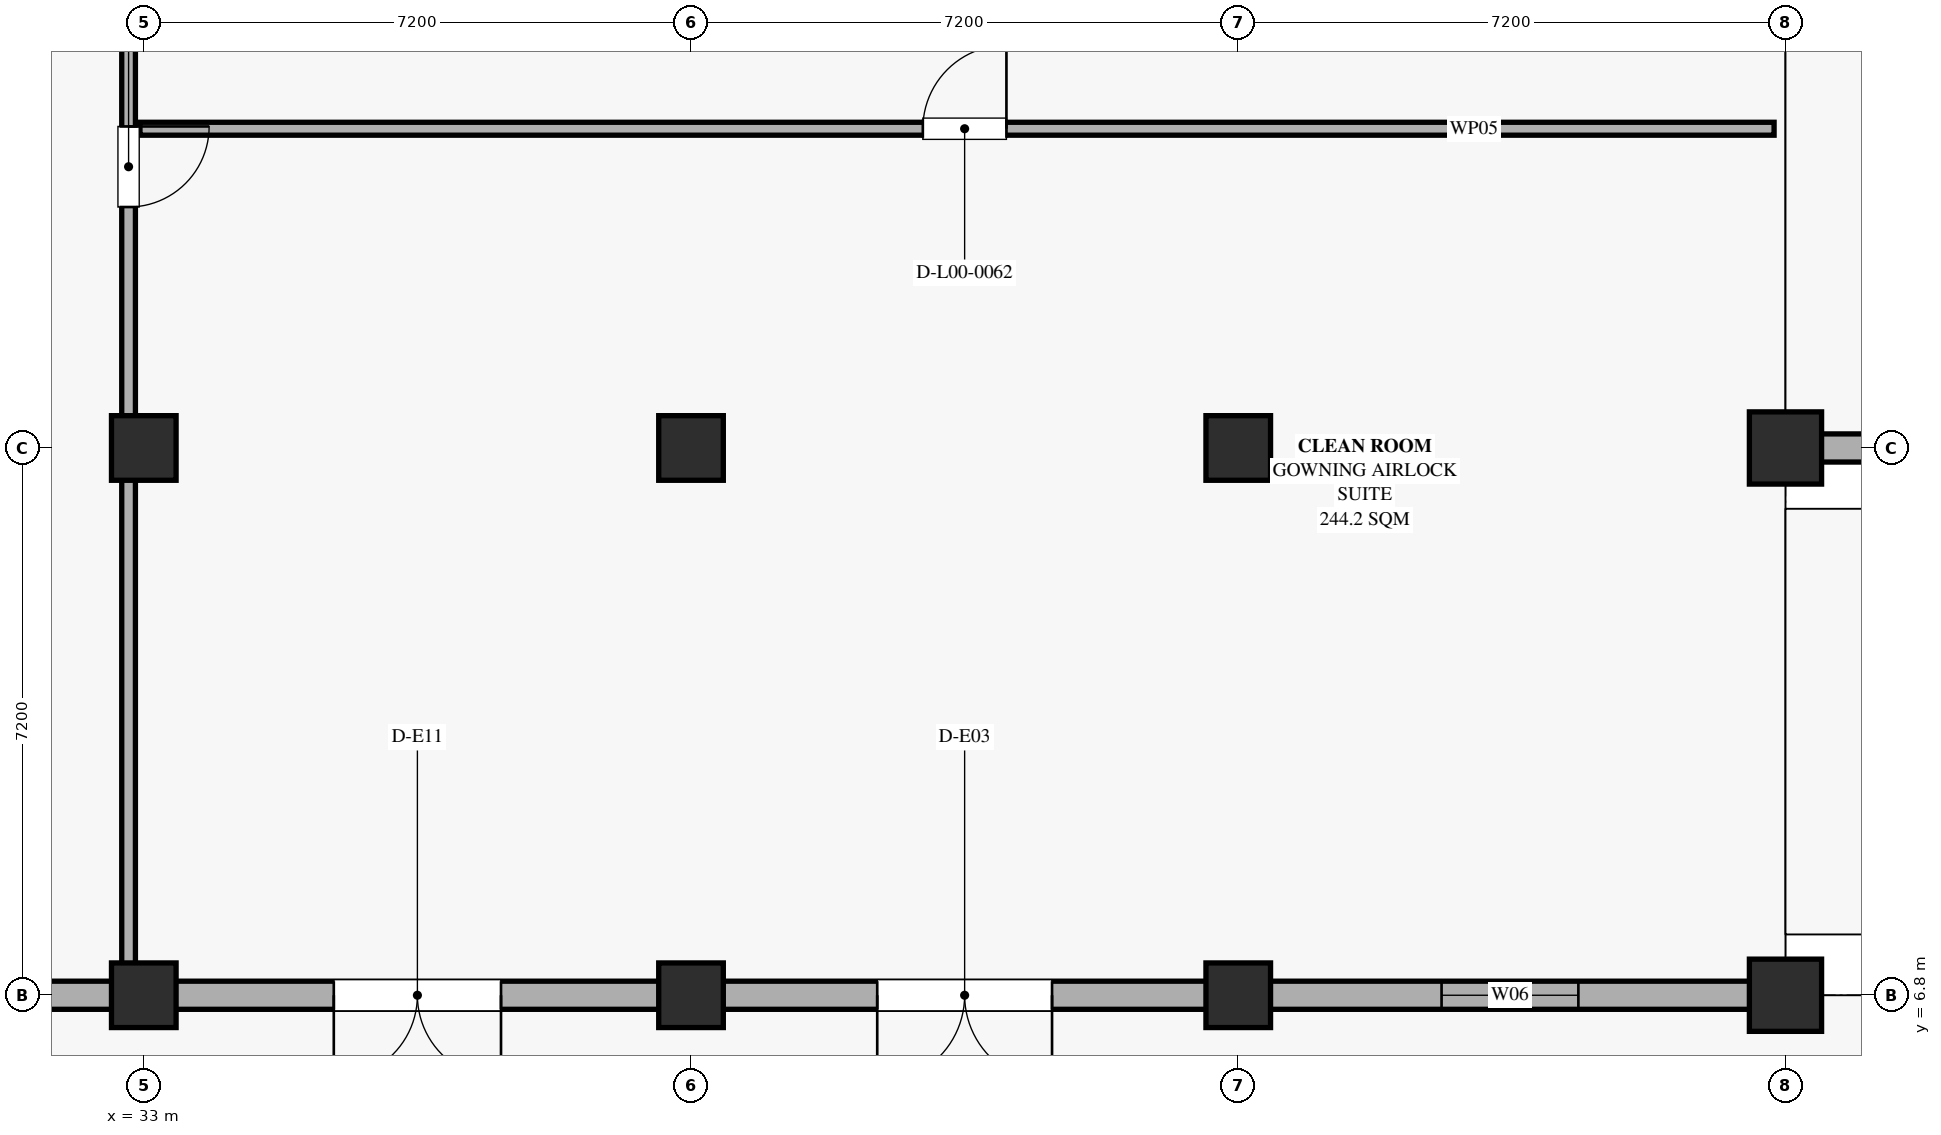
"""IFC4 building model, lengths in metres.
Left out: names, types, materials, properties, quantities, classifications, styles, units other than length and angle.
Written with IfcOpenShell. Run it as: python <this file> out.ifc"""

import sys

from ifc_helpers import new_model, si_unit, direction, frame, frame_2d, origin, origin_2d, place, context, subcontext, project, spatial, rectangle, extrude, element, fill, save


model = new_model("IFC4")
c1 = context("Model", 3, precision=1e-05, world=origin(), true_north=direction((0.0, 1.0)))
c2 = subcontext(c1, "Body", "Model", "MODEL_VIEW")
j1 = project(units=[si_unit("LENGTHUNIT", "METRE"), si_unit("PLANEANGLEUNIT", "RADIAN")], contexts=[c1])
p1 = place(None, origin())
s1 = spatial("IfcSite", under=j1, at=p1, CompositionType="ELEMENT")
p2 = place(p1, origin())
s2 = spatial("IfcBuilding", under=s1, at=p2, CompositionType="ELEMENT")
p3 = place(p2, origin())
s3 = spatial("IfcBuildingStorey", under=s2, at=p3, CompositionType="ELEMENT", Elevation=0.0)
for number, where, z_axis, x_axis in (
    (1, (33.0, 6.8, 0.0), (0.0, 0.0, 1.0), (1.0, 0.0, 0.0)),
    (2, (40.2, 6.8, 0.0), (0.0, 0.0, 1.0), (1.0, 0.0, 0.0)),
    (3, (47.4, 6.8, 0.0), (0.0, 0.0, 1.0), (1.0, 0.0, 0.0)),
):
    element("IfcColumn", number, at=place(p3, frame(where, z_axis=z_axis, x_axis=x_axis)), inside=s3, PredefinedType="COLUMN", context=c2, shape_type="SweptSolid", body=[
        extrude(rectangle(XDim=0.85, YDim=0.85, at=origin_2d()), origin(), (0.0, 0.0, 1.0), 5.4),
    ])
p4 = place(p3, frame((54.6, 6.8, 0.0), z_axis=(0.0, 0.0, 1.0), x_axis=(1.0, 0.0, 0.0)))
e4 = element("IfcColumn", 4, at=p4, inside=s3, PredefinedType="COLUMN", context=c2, shape_type="SweptSolid", body=[
    extrude(rectangle(XDim=0.95, YDim=0.95, at=origin_2d()), origin(), (0.0, 0.0, 1.0), 5.4),
])
for number, where, z_axis, x_axis in (
    (5, (33.0, 14.0, 0.0), (0.0, 0.0, 1.0), (1.0, 0.0, 0.0)),
    (6, (40.2, 14.0, 0.0), (0.0, 0.0, 1.0), (1.0, 0.0, 0.0)),
    (7, (47.4, 14.0, 0.0), (0.0, 0.0, 1.0), (1.0, 0.0, 0.0)),
):
    element("IfcColumn", number, at=place(p3, frame(where, z_axis=z_axis, x_axis=x_axis)), inside=s3, PredefinedType="COLUMN", context=c2, shape_type="SweptSolid", body=[
        extrude(rectangle(XDim=0.85, YDim=0.85, at=origin_2d()), origin(), (0.0, 0.0, 1.0), 5.4),
    ])
p5 = place(p3, frame((54.6, 14.0, 0.0), z_axis=(0.0, 0.0, 1.0), x_axis=(1.0, 0.0, 0.0)))
e8 = element("IfcColumn", 8, at=p5, inside=s3, PredefinedType="COLUMN", context=c2, shape_type="SweptSolid", body=[
    extrude(rectangle(XDim=0.95, YDim=0.95, at=origin_2d()), origin(), (0.0, 0.0, 1.0), 5.4),
])
p6 = place(p3, frame((54.14, 6.8, 0.0), z_axis=(0.0, 0.0, 1.0), x_axis=(-1.0, 0.0, 0.0)))
e9 = element("IfcWall", 9, at=p6, inside=s3, PredefinedType="SOLIDWALL", context=c2, shape_type="SweptSolid", body=[
    extrude(rectangle(XDim=6.33, YDim=0.37, at=frame_2d((3.165, 0.0))), origin(), (0.0, 0.0, 1.0), 3.9),
])
p7 = place(p6, frame((2.265, 0.0, 0.9)))
e10 = element("IfcOpeningElement", 10, at=p7, cuts=e9, PredefinedType="OPENING", context=c2, shape_type="SweptSolid", body=[
    extrude(rectangle(XDim=1.8, YDim=2.1, at=frame_2d((0.9, 1.05))), frame((0.0, 0.195, 0.0), z_axis=(0.0, -1.0, 0.0), x_axis=(1.0, 0.0, 0.0)), (0.0, 0.0, 1.0), 0.39),
])
p8 = place(p3, frame((46.99, 6.8, 0.0), z_axis=(0.0, 0.0, 1.0), x_axis=(-1.0, 0.0, 0.0)))
e11 = element("IfcWall", 11, at=p8, inside=s3, PredefinedType="SOLIDWALL", context=c2, shape_type="SweptSolid", body=[
    extrude(rectangle(XDim=6.38, YDim=0.37, at=frame_2d((3.19, 0.0))), origin(), (0.0, 0.0, 1.0), 3.9),
])
p9 = place(p8, frame((2.04, 0.0, 0.0)))
e12 = element("IfcOpeningElement", 12, at=p9, cuts=e11, PredefinedType="OPENING", context=c2, shape_type="SweptSolid", body=[
    extrude(rectangle(XDim=2.3, YDim=2.4, at=frame_2d((1.15, 1.2))), frame((0.0, 0.195, 0.0), z_axis=(0.0, -1.0, 0.0), x_axis=(1.0, 0.0, 0.0)), (0.0, 0.0, 1.0), 0.39),
])
p10 = place(p3, frame((39.79, 6.8, 0.0), z_axis=(0.0, 0.0, 1.0), x_axis=(-1.0, 0.0, 0.0)))
e13 = element("IfcWall", 13, at=p10, inside=s3, PredefinedType="SOLIDWALL", context=c2, shape_type="SweptSolid", body=[
    extrude(rectangle(XDim=6.38, YDim=0.37, at=frame_2d((3.19, 0.0))), origin(), (0.0, 0.0, 1.0), 3.9),
])
p11 = place(p10, frame((2.09, 0.0, 0.0)))
e14 = element("IfcOpeningElement", 14, at=p11, cuts=e13, PredefinedType="OPENING", context=c2, shape_type="SweptSolid", body=[
    extrude(rectangle(XDim=2.2, YDim=2.4, at=frame_2d((1.1, 1.2))), frame((0.0, 0.195, 0.0), z_axis=(0.0, -1.0, 0.0), x_axis=(1.0, 0.0, 0.0)), (0.0, 0.0, 1.0), 0.39),
])
p12 = place(p3, frame((32.59, 6.8, 0.0), z_axis=(0.0, 0.0, 1.0), x_axis=(-1.0, 0.0, 0.0)))
e15 = element("IfcWall", 15, at=p12, inside=s3, PredefinedType="SOLIDWALL", context=c2, shape_type="SweptSolid", body=[
    extrude(rectangle(XDim=6.38, YDim=0.37, at=frame_2d((3.19, 0.0))), origin(), (0.0, 0.0, 1.0), 3.9),
])
p13 = place(p12, frame((2.44, 0.0, 0.9)))
e16 = element("IfcOpeningElement", 16, at=p13, cuts=e15, PredefinedType="OPENING", context=c2, shape_type="SweptSolid", body=[
    extrude(rectangle(XDim=1.5, YDim=2.1, at=frame_2d((0.75, 1.05))), frame((0.0, 0.195, 0.0), z_axis=(0.0, -1.0, 0.0), x_axis=(1.0, 0.0, 0.0)), (0.0, 0.0, 1.0), 0.39),
])
p14 = place(p3, frame((61.34, 14.0, 0.0), z_axis=(0.0, 0.0, 1.0), x_axis=(-1.0, 0.0, 0.0)))
e17 = element("IfcWall", 17, at=p14, inside=s3, PredefinedType="SOLIDWALL", context=c2, shape_type="SweptSolid", body=[
    extrude(rectangle(XDim=6.28, YDim=0.37, at=frame_2d((3.14, 0.0))), origin(), (0.0, 0.0, 1.0), 3.9),
])
p15 = place(p14, frame((1.94, 0.0, 0.0)))
e18 = element("IfcOpeningElement", 18, at=p15, cuts=e17, PredefinedType="OPENING", context=c2, shape_type="SweptSolid", body=[
    extrude(rectangle(XDim=2.4, YDim=2.4, at=frame_2d((1.2, 1.2))), frame((0.0, 0.195, 0.0), z_axis=(0.0, -1.0, 0.0), x_axis=(1.0, 0.0, 0.0)), (0.0, 0.0, 1.0), 0.39),
])
p16 = place(p3, frame((32.8, 28.25, 0.0), z_axis=(0.0, 0.0, 1.0), x_axis=(0.0, -1.0, 0.0)))
e19 = element("IfcWall", 19, at=p16, inside=s3, PredefinedType="PARTITIONING", context=c2, shape_type="SweptSolid", body=[
    extrude(rectangle(XDim=21.1, YDim=0.18, at=frame_2d((10.55, 0.0))), origin(), (0.0, 0.0, 1.0), 3.88),
])
p17 = place(p16, frame((10.02, 0.0, 0.0)))
e20 = element("IfcOpeningElement", 20, at=p17, cuts=e19, PredefinedType="OPENING", context=c2, shape_type="SweptSolid", body=[
    extrude(rectangle(XDim=1.06, YDim=2.18, at=frame_2d((0.53, 1.09))), frame((0.0, 0.1, 0.0), z_axis=(0.0, -1.0, 0.0), x_axis=(1.0, 0.0, 0.0)), (0.0, 0.0, 1.0), 0.2),
])
p18 = place(p3, frame((32.95, 18.2, 0.0), z_axis=(0.0, 0.0, 1.0), x_axis=(1.0, 0.0, 0.0)))
e21 = element("IfcWall", 21, at=p18, inside=s3, PredefinedType="PARTITIONING", context=c2, shape_type="SweptSolid", body=[
    extrude(rectangle(XDim=21.5, YDim=0.17, at=frame_2d((10.75, 0.0))), origin(), (0.0, 0.0, 1.0), 3.88),
])
p19 = place(p18, frame((10.3, 0.0, 0.0)))
e22 = element("IfcOpeningElement", 22, at=p19, cuts=e21, PredefinedType="OPENING", context=c2, shape_type="SweptSolid", body=[
    extrude(rectangle(XDim=1.1, YDim=2.06, at=frame_2d((0.55, 1.03))), frame((0.0, 0.095, 0.0), z_axis=(0.0, -1.0, 0.0), x_axis=(1.0, 0.0, 0.0)), (0.0, 0.0, 1.0), 0.19),
])
p20 = place(p7, origin())
e23 = element("IfcWindow", 23, at=p20, inside=s3, PartitioningType="DOUBLE_PANEL_VERTICAL", PredefinedType="WINDOW", context=c2, shape_type="SweptSolid", body=[
    extrude(rectangle(XDim=1.8, YDim=2.1, at=frame_2d((0.9, 1.05))), frame((0.0, 0.03, 0.0), z_axis=(0.0, -1.0, 0.0), x_axis=(1.0, 0.0, 0.0)), (0.0, 0.0, 1.0), 0.06),
])
fill(e10, e23)
p21 = place(p9, origin())
e24 = element("IfcDoor", 24, at=p21, inside=s3, OperationType="DOUBLE_DOOR_SINGLE_SWING", PredefinedType="DOOR", context=c2, shape_type="SweptSolid", body=[
    extrude(rectangle(XDim=2.3, YDim=2.4, at=frame_2d((1.15, 1.2))), frame((0.0, 0.025, 0.0), z_axis=(0.0, -1.0, 0.0), x_axis=(1.0, 0.0, 0.0)), (0.0, 0.0, 1.0), 0.05),
])
fill(e12, e24)
p22 = place(p11, origin())
e25 = element("IfcDoor", 25, at=p22, inside=s3, OperationType="DOUBLE_DOOR_SINGLE_SWING", PredefinedType="DOOR", context=c2, shape_type="SweptSolid", body=[
    extrude(rectangle(XDim=2.2, YDim=2.4, at=frame_2d((1.1, 1.2))), frame((0.0, 0.025, 0.0), z_axis=(0.0, -1.0, 0.0), x_axis=(1.0, 0.0, 0.0)), (0.0, 0.0, 1.0), 0.05),
])
fill(e14, e25)
p23 = place(p17, origin())
e26 = element("IfcDoor", 26, at=p23, inside=s3, OperationType="SINGLE_SWING_LEFT", PredefinedType="DOOR", context=c2, shape_type="SweptSolid", body=[
    extrude(rectangle(XDim=1.06, YDim=2.18, at=frame_2d((0.53, 1.09))), frame((0.0, 0.025, 0.0), z_axis=(0.0, -1.0, 0.0), x_axis=(1.0, 0.0, 0.0)), (0.0, 0.0, 1.0), 0.05),
])
fill(e20, e26)
p24 = place(p19, origin())
e27 = element("IfcDoor", 27, at=p24, inside=s3, OperationType="SINGLE_SWING_RIGHT", PredefinedType="DOOR", context=c2, shape_type="SweptSolid", body=[
    extrude(rectangle(XDim=1.1, YDim=2.06, at=frame_2d((0.55, 1.03))), frame((0.0, 0.025, 0.0), z_axis=(0.0, -1.0, 0.0), x_axis=(1.0, 0.0, 0.0)), (0.0, 0.0, 1.0), 0.05),
])
fill(e22, e27)
save(model, sys.argv[1])
